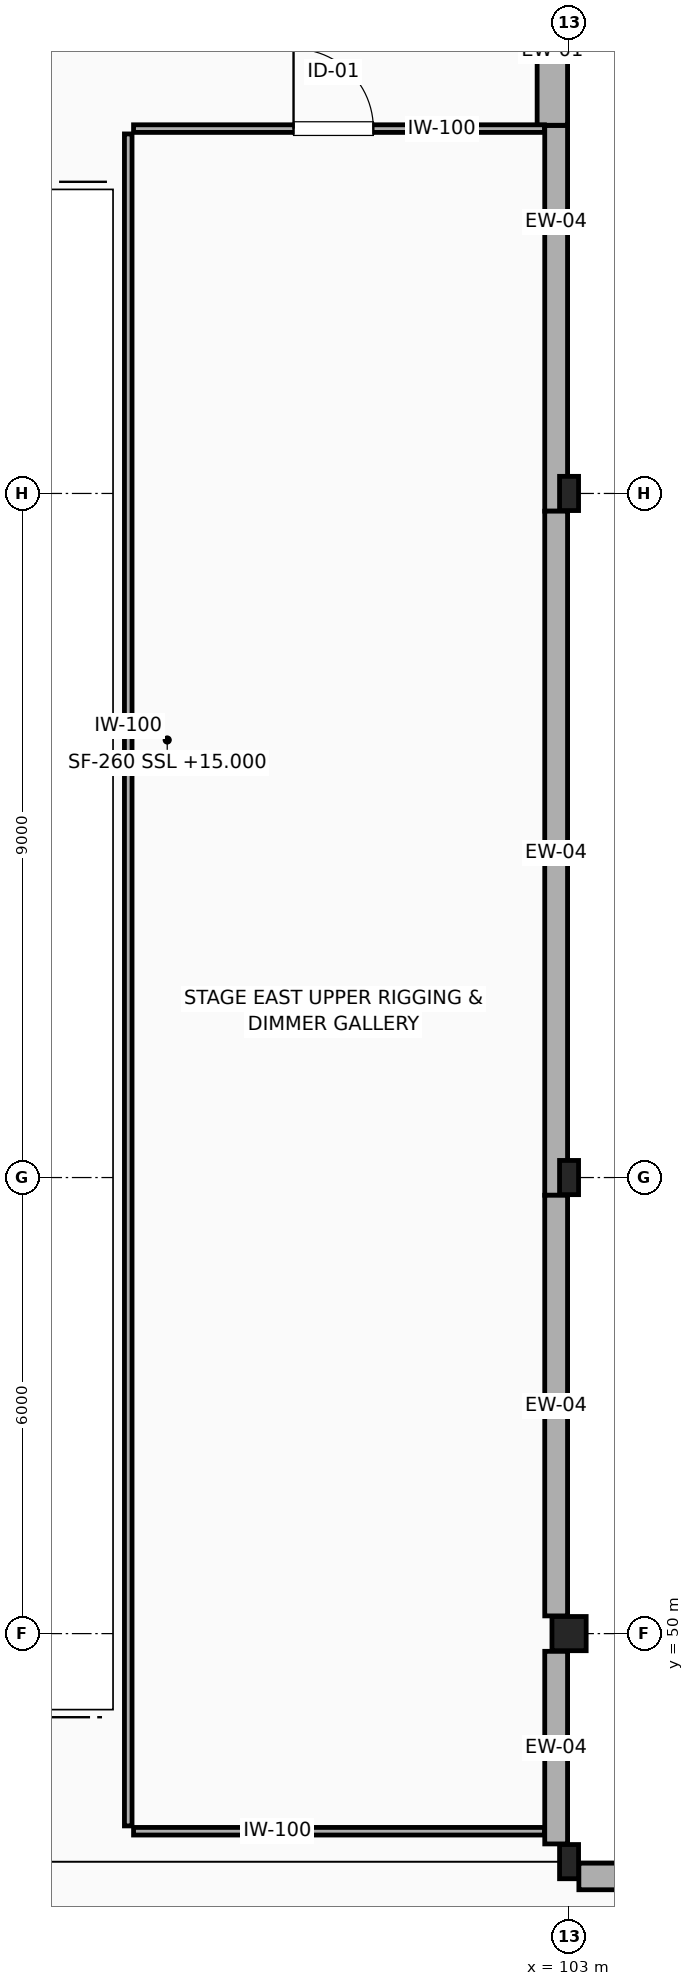
"""IFC4 building model, lengths in metres.
Left out: names, types, materials, properties, quantities, classifications, styles, units other than length and angle.
Written with IfcOpenShell. Run it as: python <this file> out.ifc"""

import sys

from ifc_helpers import new_model, si_unit, direction, frame, frame_2d, origin, origin_2d, place, context, subcontext, project, spatial, rectangle, hollow_rectangle, i_section, extrude, element, fill, save


model = new_model("IFC4")
c1 = context("Model", 3, precision=1e-05, world=origin(), true_north=direction((0.0, 1.0)))
c2 = subcontext(c1, "Body", "Model", "MODEL_VIEW")
j1 = project(units=[si_unit("LENGTHUNIT", "METRE"), si_unit("PLANEANGLEUNIT", "RADIAN")], contexts=[c1])
p1 = place(None, origin())
s1 = spatial("IfcSite", under=j1, at=p1, CompositionType="ELEMENT")
p2 = place(p1, origin())
s2 = spatial("IfcBuilding", under=s1, at=p2, CompositionType="ELEMENT")
p3 = place(p2, frame((0.0, 0.0, 15.0)))
s3 = spatial("IfcBuildingStorey", under=s2, at=p3, CompositionType="ELEMENT", Elevation=15.0)
p4 = place(p3, frame((103.0, 50.0, 0.0), z_axis=(0.0, 0.0, 1.0), x_axis=(1.0, 0.0, 0.0)))
e1 = element("IfcColumn", 1, at=p4, inside=s3, PredefinedType="COLUMN", context=c2, shape_type="SweptSolid", body=[
    extrude(hollow_rectangle(XDim=0.45, YDim=0.45, WallThickness=0.02, at=origin_2d()), origin(), (0.0, 0.0, 1.0), 4.8),
])
for number, where, z_axis, x_axis in (
    (2, (103.0, 56.0, 0.0), (0.0, 0.0, 1.0), (1.0, 0.0, 0.0)),
    (3, (103.0, 65.0, 0.0), (0.0, 0.0, 1.0), (1.0, 0.0, 0.0)),
    (4, (103.0, 47.0, 0.0), (0.0, 0.0, 1.0), (1.0, 0.0, 0.0)),
):
    element("IfcColumn", number, at=place(p3, frame(where, z_axis=z_axis, x_axis=x_axis)), inside=s3, PredefinedType="COLUMN", context=c2, shape_type="SweptSolid", body=[
        extrude(i_section(OverallWidth=0.25, OverallDepth=0.45, WebThickness=0.011, FlangeThickness=0.014, FilletRadius=0.015, at=origin_2d()), origin(), (0.0, 0.0, 1.0), 4.8),
    ])
p5 = place(p3, frame((102.78, 73.767, 0.0), z_axis=(0.0, 0.0, 1.0), x_axis=(0.0, -1.0, 0.0)))
e5 = element("IfcWall", 5, at=p5, inside=s3, PredefinedType="STANDARD", context=c2, shape_type="SweptSolid", body=[
    extrude(rectangle(XDim=3.923, YDim=0.4, at=frame_2d((1.961, 0.0))), origin(), (0.0, 0.0, 1.0), 3.785),
])
p6 = place(p3, frame((102.83, 69.84, 0.0), z_axis=(0.0, 0.0, 1.0), x_axis=(0.0, -1.0, 0.0)))
e6 = element("IfcWall", 6, at=p6, inside=s3, PredefinedType="STANDARD", context=c2, shape_type="SweptSolid", body=[
    extrude(rectangle(XDim=5.073, YDim=0.3, at=frame_2d((2.537, 0.0))), origin(), (0.0, 0.0, 1.0), 3.785),
])
p7 = place(p3, frame((102.83, 64.767, 0.0), z_axis=(0.0, 0.0, 1.0), x_axis=(0.0, -1.0, 0.0)))
e7 = element("IfcWall", 7, at=p7, inside=s3, PredefinedType="STANDARD", context=c2, shape_type="SweptSolid", body=[
    extrude(rectangle(XDim=9.0, YDim=0.3, at=frame_2d((4.5, 0.0))), origin(), (0.0, 0.0, 1.0), 3.685),
])
p8 = place(p3, frame((102.83, 55.767, 0.0), z_axis=(0.0, 0.0, 1.0), x_axis=(0.0, -1.0, 0.0)))
e8 = element("IfcWall", 8, at=p8, inside=s3, PredefinedType="STANDARD", context=c2, shape_type="SweptSolid", body=[
    extrude(rectangle(XDim=5.534, YDim=0.3, at=frame_2d((2.767, 0.0))), origin(), (0.0, 0.0, 1.0), 3.535),
])
p9 = place(p3, frame((102.83, 49.767, 0.0), z_axis=(0.0, 0.0, 1.0), x_axis=(0.0, -1.0, 0.0)))
e9 = element("IfcWall", 9, at=p9, inside=s3, PredefinedType="STANDARD", context=c2, shape_type="SweptSolid", body=[
    extrude(rectangle(XDim=2.534, YDim=0.3, at=frame_2d((1.267, 0.0))), origin(), (0.0, 0.0, 1.0), 4.085),
])
p10 = place(p3, frame((103.129, 46.805, 0.0), z_axis=(0.0, 0.0, 1.0), x_axis=(1.0, 0.0, 0.0)))
e10 = element("IfcWall", 10, at=p10, inside=s3, PredefinedType="STANDARD", context=c2, shape_type="SweptSolid", body=[
    extrude(rectangle(XDim=15.286, YDim=0.35, at=frame_2d((7.643, 0.0))), origin(), (0.0, 0.0, 1.0), 3.735),
])
p11 = place(p3, frame((97.27, 69.8, 0.0), z_axis=(0.0, 0.0, 1.0), x_axis=(1.0, 0.0, 0.0)))
e11 = element("IfcWall", 11, at=p11, inside=s3, PredefinedType="PARTITIONING", context=c2, shape_type="SweptSolid", body=[
    extrude(rectangle(XDim=5.406, YDim=0.1, at=frame_2d((2.703, 0.0))), origin(), (0.0, 0.0, 1.0), 4.54),
])
p12 = place(p11, frame((2.105, 0.0, 0.0)))
e12 = element("IfcOpeningElement", 12, at=p12, cuts=e11, PredefinedType="OPENING", context=c2, shape_type="SweptSolid", body=[
    extrude(rectangle(XDim=1.05, YDim=2.15, at=frame_2d((0.525, 1.075))), frame((0.0, 0.06, 0.0), z_axis=(0.0, -1.0, 0.0), x_axis=(1.0, 0.0, 0.0)), (0.0, 0.0, 1.0), 0.12),
])
p13 = place(p3, frame((102.676, 47.4, 0.0), z_axis=(0.0, 0.0, 1.0), x_axis=(-1.0, 0.0, 0.0)))
e13 = element("IfcWall", 13, at=p13, inside=s3, PredefinedType="PARTITIONING", context=c2, shape_type="SweptSolid", body=[
    extrude(rectangle(XDim=5.406, YDim=0.1, at=frame_2d((2.703, 0.0))), origin(), (0.0, 0.0, 1.0), 3.73),
])
p14 = place(p3, frame((97.2, 47.47, 0.0), z_axis=(0.0, 0.0, 1.0), x_axis=(0.0, 1.0, 0.0)))
e14 = element("IfcWall", 14, at=p14, inside=s3, PredefinedType="PARTITIONING", context=c2, shape_type="SweptSolid", body=[
    extrude(rectangle(XDim=22.26, YDim=0.1, at=frame_2d((11.13, 0.0))), origin(), (0.0, 0.0, 1.0), 4.54),
])
p15 = place(p12, origin())
e15 = element("IfcDoor", 15, at=p15, inside=s3, OperationType="SINGLE_SWING_LEFT", PredefinedType="DOOR", context=c2, shape_type="SweptSolid", body=[
    extrude(rectangle(XDim=1.05, YDim=2.15, at=frame_2d((0.525, 1.075))), frame((0.0, 0.025, 0.0), z_axis=(0.0, -1.0, 0.0), x_axis=(1.0, 0.0, 0.0)), (0.0, 0.0, 1.0), 0.05),
])
fill(e12, e15)
save(model, sys.argv[1])
